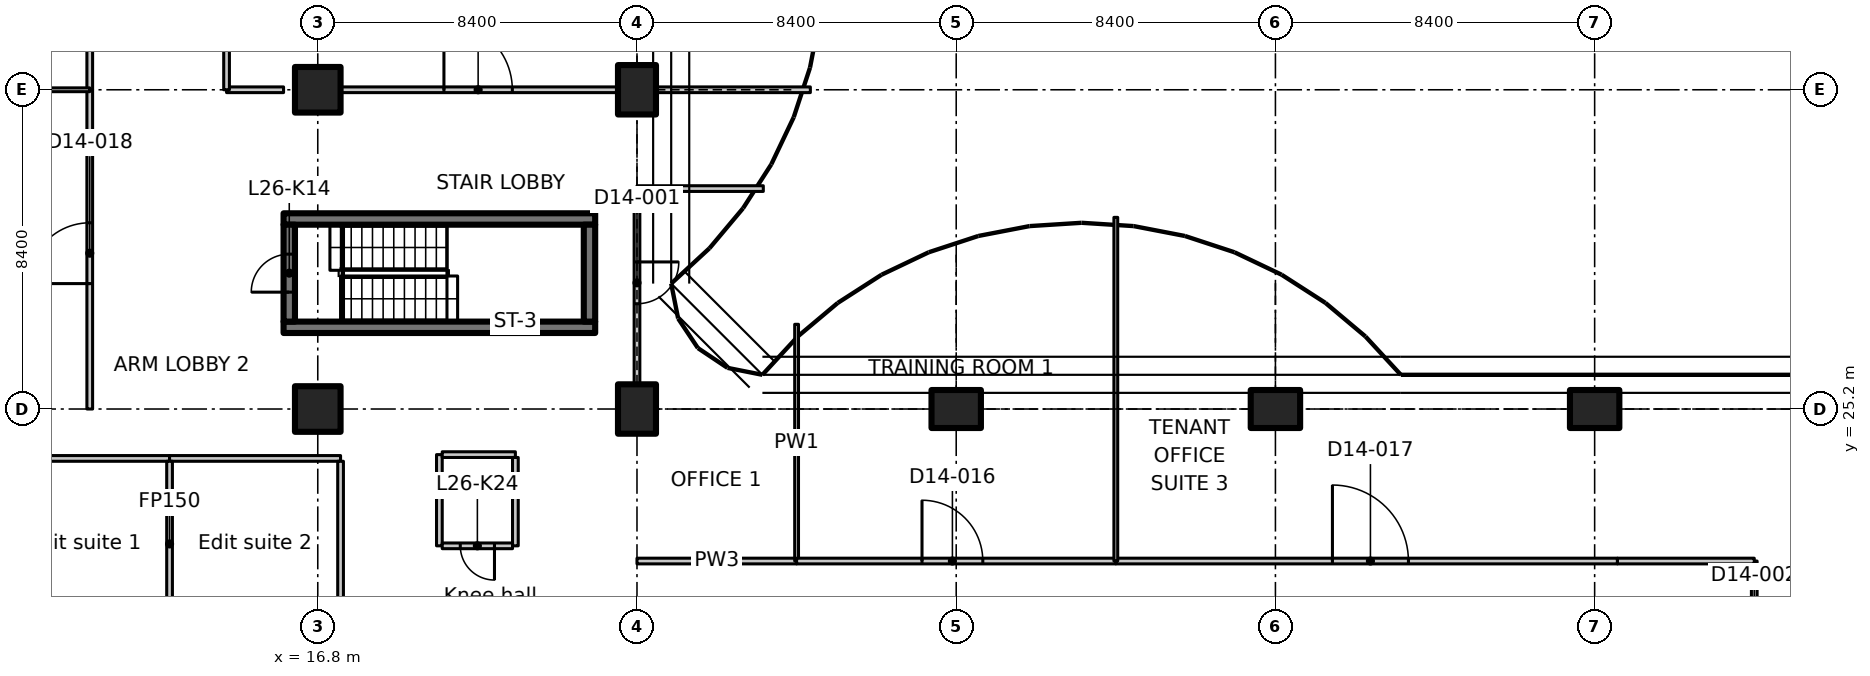
"""IFC4 building model, lengths in metres.
Left out: names, types, materials, properties, quantities, classifications, styles, units other than length and angle.
Written with IfcOpenShell. Run it as: python <this file> out.ifc"""

import sys

from ifc_helpers import new_model, si_unit, direction, frame, frame_2d, origin, origin_2d, place, context, subcontext, project, spatial, polyline, rectangle, outline, extrude, element, fill, save


model = new_model("IFC4")
c1 = context("Model", 3, precision=1e-05, world=origin(), true_north=direction((0.0, 1.0)))
c2 = subcontext(c1, "Body", "Model", "MODEL_VIEW")
j1 = project(units=[si_unit("LENGTHUNIT", "METRE"), si_unit("PLANEANGLEUNIT", "RADIAN")], contexts=[c1])
p1 = place(None, origin())
s1 = spatial("IfcSite", under=j1, at=p1, CompositionType="ELEMENT")
p2 = place(p1, origin())
s2 = spatial("IfcBuilding", under=s1, at=p2, CompositionType="ELEMENT")
p3 = place(p2, frame((0.0, 0.0, 109.7)))
s3 = spatial("IfcBuildingStorey", under=s2, at=p3, CompositionType="ELEMENT", Elevation=109.7)
for number, where, z_axis, x_axis in (
    (1, (16.8, 25.2, 0.0), (0.0, 0.0, 1.0), (1.0, 0.0, 0.0)),
    (2, (16.8, 33.6, 0.0), (0.0, 0.0, 1.0), (1.0, 0.0, 0.0)),
):
    element("IfcColumn", number, at=place(p3, frame(where, z_axis=z_axis, x_axis=x_axis)), inside=s3, PredefinedType="COLUMN", context=c2, shape_type="SweptSolid", body=[
        extrude(rectangle(XDim=1.2, YDim=1.2, at=origin_2d()), origin(), (0.0, 0.0, 1.0), 3.35),
    ])
for number, where, z_axis, x_axis in (
    (3, (25.2, 25.2, 0.0), (0.0, 0.0, 1.0), (1.0, 0.0, 0.0)),
    (4, (25.2, 33.6, 0.0), (0.0, 0.0, 1.0), (1.0, 0.0, 0.0)),
    (5, (33.6, 25.2, 0.0), (0.0, 0.0, 1.0), (0.0, 1.0, 0.0)),
    (6, (42.0, 25.2, 0.0), (0.0, 0.0, 1.0), (0.0, 1.0, 0.0)),
    (7, (50.4, 25.2, 0.0), (0.0, 0.0, 1.0), (0.0, 1.0, 0.0)),
):
    element("IfcColumn", number, at=place(p3, frame(where, z_axis=z_axis, x_axis=x_axis)), inside=s3, PredefinedType="COLUMN", context=c2, shape_type="SweptSolid", body=[
        extrude(rectangle(XDim=1.0, YDim=1.3, at=origin_2d()), origin(), (0.0, 0.0, 1.0), 3.35),
    ])
for number, where, z_axis, x_axis in (
    (8, (15.9, 27.35, 0.0), (0.0, 0.0, 1.0), (1.0, 0.0, 0.0)),
    (9, (15.9, 30.2, 0.0), (0.0, 0.0, 1.0), (1.0, 0.0, 0.0)),
):
    element("IfcWall", number, at=place(p3, frame(where, z_axis=z_axis, x_axis=x_axis)), inside=s3, PredefinedType="SHEAR", context=c2, shape_type="SweptSolid", body=[
        extrude(rectangle(XDim=8.2, YDim=0.3, at=frame_2d((4.1, 0.0))), origin(), (0.0, 0.0, 1.0), 3.35),
    ])
p4 = place(p3, frame((16.05, 27.5, 0.0), z_axis=(0.0, 0.0, 1.0), x_axis=(0.0, 1.0, 0.0)))
e10 = element("IfcWall", 10, at=p4, inside=s3, PredefinedType="SHEAR", context=c2, shape_type="SweptSolid", body=[
    extrude(rectangle(XDim=2.55, YDim=0.3, at=frame_2d((1.275, 0.0))), origin(), (0.0, 0.0, 1.0), 3.35),
])
p5 = place(p4, frame((0.775, 0.0, 0.0)))
e11 = element("IfcOpeningElement", 11, at=p5, cuts=e10, PredefinedType="OPENING", context=c2, shape_type="SweptSolid", body=[
    extrude(rectangle(XDim=1.0, YDim=2.1, at=frame_2d((0.5, 1.05))), frame((0.0, 0.16, 0.0), z_axis=(0.0, -1.0, 0.0), x_axis=(1.0, 0.0, 0.0)), (0.0, 0.0, 1.0), 0.32),
])
p6 = place(p3, frame((23.95, 27.5, 0.0), z_axis=(0.0, 0.0, 1.0), x_axis=(0.0, 1.0, 0.0)))
e12 = element("IfcWall", 12, at=p6, inside=s3, PredefinedType="SHEAR", context=c2, shape_type="SweptSolid", body=[
    extrude(rectangle(XDim=2.55, YDim=0.3, at=frame_2d((1.275, 0.0))), origin(), (0.0, 0.0, 1.0), 3.35),
])
p7 = place(p3, frame((8.575, 23.9, 0.0), z_axis=(0.0, 0.0, 1.0), x_axis=(1.0, 0.0, 0.0)))
e13 = element("IfcWall", 13, at=p7, inside=s3, PredefinedType="PARTITIONING", context=c2, shape_type="SweptSolid", body=[
    extrude(rectangle(XDim=4.325, YDim=0.15, at=frame_2d((2.163, 0.0))), origin(), (0.0, 0.0, 1.0), 3.35),
])
p8 = place(p3, frame((12.9, 23.9, 0.0), z_axis=(0.0, 0.0, 1.0), x_axis=(1.0, 0.0, 0.0)))
e14 = element("IfcWall", 14, at=p8, inside=s3, PredefinedType="PARTITIONING", context=c2, shape_type="SweptSolid", body=[
    extrude(rectangle(XDim=4.5, YDim=0.15, at=frame_2d((2.25, 0.0))), origin(), (0.0, 0.0, 1.0), 3.35),
])
p9 = place(p3, frame((17.4, 23.825, 0.0), z_axis=(0.0, 0.0, 1.0), x_axis=(0.0, -1.0, 0.0)))
e15 = element("IfcWall", 15, at=p9, inside=s3, PredefinedType="PARTITIONING", context=c2, shape_type="SweptSolid", body=[
    extrude(rectangle(XDim=4.425, YDim=0.15, at=frame_2d((2.212, 0.0))), origin(), (0.0, 0.0, 1.0), 3.35),
])
p10 = place(p3, frame((12.9, 23.825, 0.0), z_axis=(0.0, 0.0, 1.0), x_axis=(0.0, -1.0, 0.0)))
e16 = element("IfcWall", 16, at=p10, inside=s3, PredefinedType="PARTITIONING", context=c2, shape_type="SweptSolid", body=[
    extrude(rectangle(XDim=4.35, YDim=0.15, at=frame_2d((2.175, 0.0))), origin(), (0.0, 0.0, 1.0), 3.35),
])
p11 = place(p3, frame((20.0, 21.6, 0.0), z_axis=(0.0, 0.0, 1.0), x_axis=(0.0, 1.0, 0.0)))
e17 = element("IfcWall", 17, at=p11, inside=s3, PredefinedType="PARTITIONING", context=c2, shape_type="SweptSolid", body=[
    extrude(rectangle(XDim=2.4, YDim=0.15, at=frame_2d((1.2, 0.0))), origin(), (0.0, 0.0, 1.0), 3.35),
])
p12 = place(p3, frame((20.075, 24.0, 0.0), z_axis=(0.0, 0.0, 1.0), x_axis=(1.0, 0.0, 0.0)))
e18 = element("IfcWall", 18, at=p12, inside=s3, PredefinedType="PARTITIONING", context=c2, shape_type="SweptSolid", body=[
    extrude(rectangle(XDim=1.925, YDim=0.15, at=frame_2d((0.962, 0.0))), origin(), (0.0, 0.0, 1.0), 3.35),
])
p13 = place(p3, frame((22.0, 23.925, 0.0), z_axis=(0.0, 0.0, 1.0), x_axis=(0.0, -1.0, 0.0)))
e19 = element("IfcWall", 19, at=p13, inside=s3, PredefinedType="PARTITIONING", context=c2, shape_type="SweptSolid", body=[
    extrude(rectangle(XDim=2.325, YDim=0.15, at=frame_2d((1.163, 0.0))), origin(), (0.0, 0.0, 1.0), 3.35),
])
p14 = place(p3, frame((21.925, 21.6, 0.0), z_axis=(0.0, 0.0, 1.0), x_axis=(-1.0, 0.0, 0.0)))
e20 = element("IfcWall", 20, at=p14, inside=s3, PredefinedType="PARTITIONING", context=c2, shape_type="SweptSolid", body=[
    extrude(rectangle(XDim=1.85, YDim=0.15, at=frame_2d((0.925, 0.0))), origin(), (0.0, 0.0, 1.0), 3.35),
])
p15 = place(p14, frame((0.475, 0.0, 0.0)))
e21 = element("IfcOpeningElement", 21, at=p15, cuts=e20, PredefinedType="OPENING", context=c2, shape_type="SweptSolid", body=[
    extrude(rectangle(XDim=0.9, YDim=2.1, at=frame_2d((0.45, 1.05))), frame((0.0, 0.085, 0.0), z_axis=(0.0, -1.0, 0.0), x_axis=(1.0, 0.0, 0.0)), (0.0, 0.0, 1.0), 0.17),
])
p16 = place(p3, frame((25.2, 21.2, 0.0), z_axis=(0.0, 0.0, 1.0), x_axis=(1.0, 0.0, 0.0)))
e22 = element("IfcWall", 22, at=p16, inside=s3, PredefinedType="PARTITIONING", context=c2, shape_type="SweptSolid", body=[
    extrude(rectangle(XDim=4.2, YDim=0.15, at=frame_2d((2.1, 0.0))), origin(), (0.0, 0.0, 1.0), 3.33),
])
p17 = place(p3, frame((29.4, 27.429, 0.0), z_axis=(0.0, 0.0, 1.0), x_axis=(0.0, -1.0, 0.0)))
e23 = element("IfcWall", 23, at=p17, inside=s3, PredefinedType="PARTITIONING", context=c2, shape_type="SweptSolid", body=[
    extrude(outline(polyline([(0.0, 0.0), (6.229, 0.0), (6.229, 3.33), (2.679, 3.33), (2.677, 2.98), (1.781, 2.98), (1.779, 3.33), (0.154, 3.33), (0.0, 3.33), (0.0, 0.0)])), frame((0.0, 0.05, 0.0), z_axis=(0.0, -1.0, 0.0), x_axis=(1.0, 0.0, 0.0)), (0.0, 0.0, 1.0), 0.1),
])
p18 = place(p3, frame((25.2, 31.0, 0.0), z_axis=(0.0, 0.0, 1.0), x_axis=(0.0, -1.0, 0.0)))
e24 = element("IfcWall", 24, at=p18, inside=s3, PredefinedType="PARTITIONING", context=c2, shape_type="SweptSolid", body=[
    extrude(outline(polyline([(0.0, 0.0), (5.13, 0.0), (5.13, 2.98), (0.0, 2.98), (0.0, 0.0)])), frame((0.0, 0.075, 0.0), z_axis=(0.0, -1.0, 0.0), x_axis=(1.0, 0.0, 0.0)), (0.0, 0.0, 1.0), 0.15),
])
p19 = place(p18, frame((1.93, 0.0, 0.0)))
e25 = element("IfcOpeningElement", 25, at=p19, cuts=e24, PredefinedType="OPENING", context=c2, shape_type="SweptSolid", body=[
    extrude(rectangle(XDim=1.1, YDim=2.1, at=frame_2d((0.55, 1.05))), frame((0.0, 0.085, 0.0), z_axis=(0.0, -1.0, 0.0), x_axis=(1.0, 0.0, 0.0)), (0.0, 0.0, 1.0), 0.17),
])
p20 = place(p3, frame((25.2, 31.0, 0.0), z_axis=(0.0, 0.0, 1.0), x_axis=(1.0, 0.0, 0.0)))
e26 = element("IfcWall", 26, at=p20, inside=s3, PredefinedType="PARTITIONING", context=c2, shape_type="SweptSolid", body=[
    extrude(rectangle(XDim=3.324, YDim=0.15, at=frame_2d((1.662, 0.0))), origin(), (0.0, 0.0, 1.0), 2.98),
])
p21 = place(p3, frame((54.6, 21.2, 0.0), z_axis=(0.0, 0.0, 1.0), x_axis=(0.0, -1.0, 0.0)))
e27 = element("IfcWall", 27, at=p21, inside=s3, PredefinedType="PARTITIONING", context=c2, shape_type="SweptSolid", body=[
    extrude(rectangle(XDim=8.2, YDim=0.15, at=frame_2d((4.1, 0.0))), origin(), (0.0, 0.0, 1.0), 3.33),
])
p22 = place(p21, frame((3.2, 0.0, 0.0)))
e28 = element("IfcOpeningElement", 28, at=p22, cuts=e27, PredefinedType="OPENING", context=c2, shape_type="SweptSolid", body=[
    extrude(rectangle(XDim=2.0, YDim=2.4, at=frame_2d((1.0, 1.2))), frame((0.0, 0.085, 0.0), z_axis=(0.0, -1.0, 0.0), x_axis=(1.0, 0.0, 0.0)), (0.0, 0.0, 1.0), 0.17),
])
p23 = place(p3, frame((29.4, 21.2, 0.0), z_axis=(0.0, 0.0, 1.0), x_axis=(1.0, 0.0, 0.0)))
e29 = element("IfcWall", 29, at=p23, inside=s3, PredefinedType="PARTITIONING", context=c2, shape_type="SweptSolid", body=[
    extrude(rectangle(XDim=8.4, YDim=0.15, at=frame_2d((4.2, 0.0))), origin(), (0.0, 0.0, 1.0), 3.33),
])
p24 = place(p23, frame((3.3, 0.0, 0.0)))
e30 = element("IfcOpeningElement", 30, at=p24, cuts=e29, PredefinedType="OPENING", context=c2, shape_type="SweptSolid", body=[
    extrude(rectangle(XDim=1.6, YDim=2.1, at=frame_2d((0.8, 1.05))), frame((0.0, 0.085, 0.0), z_axis=(0.0, -1.0, 0.0), x_axis=(1.0, 0.0, 0.0)), (0.0, 0.0, 1.0), 0.17),
])
p25 = place(p3, frame((37.8, 21.2, 0.0), z_axis=(0.0, 0.0, 1.0), x_axis=(1.0, 0.0, 0.0)))
e31 = element("IfcWall", 31, at=p25, inside=s3, PredefinedType="PARTITIONING", context=c2, shape_type="SweptSolid", body=[
    extrude(rectangle(XDim=13.2, YDim=0.15, at=frame_2d((6.6, 0.0))), origin(), (0.0, 0.0, 1.0), 3.33),
])
p26 = place(p25, frame((5.7, 0.0, 0.0)))
e32 = element("IfcOpeningElement", 32, at=p26, cuts=e31, PredefinedType="OPENING", context=c2, shape_type="SweptSolid", body=[
    extrude(rectangle(XDim=2.0, YDim=2.4, at=frame_2d((1.0, 1.2))), frame((0.0, 0.085, 0.0), z_axis=(0.0, -1.0, 0.0), x_axis=(1.0, 0.0, 0.0)), (0.0, 0.0, 1.0), 0.17),
])
p27 = place(p3, frame((51.0, 21.2, 0.0), z_axis=(0.0, 0.0, 1.0), x_axis=(1.0, 0.0, 0.0)))
e33 = element("IfcWall", 33, at=p27, inside=s3, PredefinedType="PARTITIONING", context=c2, shape_type="SweptSolid", body=[
    extrude(rectangle(XDim=3.6, YDim=0.15, at=frame_2d((1.8, 0.0))), origin(), (0.0, 0.0, 1.0), 3.33),
])
p28 = place(p3, frame((37.8, 30.243, 0.0), z_axis=(0.0, 0.0, 1.0), x_axis=(0.0, -1.0, 0.0)))
e34 = element("IfcWall", 34, at=p28, inside=s3, PredefinedType="PARTITIONING", context=c2, shape_type="SweptSolid", body=[
    extrude(outline(polyline([(0.0, 0.0), (9.043, 0.0), (9.043, 3.33), (5.493, 3.33), (5.491, 2.98), (4.595, 2.98), (4.593, 3.33), (0.0, 3.33), (0.0, 0.0)])), frame((0.0, 0.05, 0.0), z_axis=(0.0, -1.0, 0.0), x_axis=(1.0, 0.0, 0.0)), (0.0, 0.0, 1.0), 0.1),
])
p29 = place(p3, frame((10.8, 25.2, 0.0), z_axis=(0.0, 0.0, 1.0), x_axis=(0.0, 1.0, 0.0)))
e35 = element("IfcWall", 35, at=p29, inside=s3, PredefinedType="PARTITIONING", context=c2, shape_type="SweptSolid", body=[
    extrude(rectangle(XDim=8.4, YDim=0.15, at=frame_2d((4.2, 0.0))), origin(), (0.0, 0.0, 1.0), 3.33),
])
p30 = place(p29, frame((3.3, 0.0, 0.0)))
e36 = element("IfcOpeningElement", 36, at=p30, cuts=e35, PredefinedType="OPENING", context=c2, shape_type="SweptSolid", body=[
    extrude(rectangle(XDim=1.6, YDim=2.1, at=frame_2d((0.8, 1.05))), frame((0.0, 0.085, 0.0), z_axis=(0.0, -1.0, 0.0), x_axis=(1.0, 0.0, 0.0)), (0.0, 0.0, 1.0), 0.17),
])
p31 = place(p3, frame((14.4, 33.6, 0.0), z_axis=(0.0, 0.0, 1.0), x_axis=(1.0, 0.0, 0.0)))
e37 = element("IfcWall", 37, at=p31, inside=s3, PredefinedType="PARTITIONING", context=c2, shape_type="SweptSolid", body=[
    extrude(rectangle(XDim=1.5, YDim=0.15, at=frame_2d((0.75, 0.0))), origin(), (0.0, 0.0, 1.0), 3.33),
])
p32 = place(p3, frame((17.42, 33.6, 0.0), z_axis=(0.0, 0.0, 1.0), x_axis=(1.0, 0.0, 0.0)))
e38 = element("IfcWall", 38, at=p32, inside=s3, PredefinedType="PARTITIONING", context=c2, shape_type="SweptSolid", body=[
    extrude(rectangle(XDim=7.26, YDim=0.15, at=frame_2d((3.63, 0.0))), origin(), (0.0, 0.0, 1.0), 3.33),
])
p33 = place(p32, frame((2.7, 0.0, 0.0)))
e39 = element("IfcOpeningElement", 39, at=p33, cuts=e38, PredefinedType="OPENING", context=c2, shape_type="SweptSolid", body=[
    extrude(rectangle(XDim=1.8, YDim=2.1, at=frame_2d((0.9, 1.05))), frame((0.0, 0.085, 0.0), z_axis=(0.0, -1.0, 0.0), x_axis=(1.0, 0.0, 0.0)), (0.0, 0.0, 1.0), 0.17),
])
p34 = place(p3, frame((25.72, 33.6, 0.0), z_axis=(0.0, 0.0, 1.0), x_axis=(1.0, 0.0, 0.0)))
e40 = element("IfcWall", 40, at=p34, inside=s3, PredefinedType="PARTITIONING", context=c2, shape_type="SweptSolid", body=[
    extrude(rectangle(XDim=4.042, YDim=0.15, at=frame_2d((2.021, 0.0))), origin(), (0.0, 0.0, 1.0), 2.98),
])
p35 = place(p3, frame((10.8, 33.6, 0.0), z_axis=(0.0, 0.0, 1.0), x_axis=(0.0, 1.0, 0.0)))
e41 = element("IfcWall", 41, at=p35, inside=s3, PredefinedType="PARTITIONING", context=c2, shape_type="SweptSolid", body=[
    extrude(rectangle(XDim=8.4, YDim=0.15, at=frame_2d((4.2, 0.0))), origin(), (0.0, 0.0, 1.0), 3.33),
])
p36 = place(p35, frame((3.3, 0.0, 0.0)))
e42 = element("IfcOpeningElement", 42, at=p36, cuts=e41, PredefinedType="OPENING", context=c2, shape_type="SweptSolid", body=[
    extrude(rectangle(XDim=1.6, YDim=2.1, at=frame_2d((0.8, 1.05))), frame((0.0, 0.085, 0.0), z_axis=(0.0, -1.0, 0.0), x_axis=(1.0, 0.0, 0.0)), (0.0, 0.0, 1.0), 0.17),
])
p37 = place(p3, frame((14.4, 42.0, 0.0), z_axis=(0.0, 0.0, 1.0), x_axis=(0.0, -1.0, 0.0)))
e43 = element("IfcWall", 43, at=p37, inside=s3, PredefinedType="PARTITIONING", context=c2, shape_type="SweptSolid", body=[
    extrude(rectangle(XDim=8.4, YDim=0.15, at=frame_2d((4.2, 0.0))), origin(), (0.0, 0.0, 1.0), 3.33),
])
p38 = place(p3, frame((9.02, 33.6, 0.0), z_axis=(0.0, 0.0, 1.0), x_axis=(1.0, 0.0, 0.0)))
e44 = element("IfcWall", 44, at=p38, inside=s3, PredefinedType="PARTITIONING", context=c2, shape_type="SweptSolid", body=[
    extrude(rectangle(XDim=1.78, YDim=0.1, at=frame_2d((0.89, 0.0))), origin(), (0.0, 0.0, 1.0), 3.33),
])
p39 = place(p5, origin())
e45 = element("IfcDoor", 45, at=p39, inside=s3, OperationType="SINGLE_SWING_RIGHT", PredefinedType="DOOR", context=c2, shape_type="SweptSolid", body=[
    extrude(rectangle(XDim=1.0, YDim=2.1, at=frame_2d((0.5, 1.05))), frame((0.0, 0.025, 0.0), z_axis=(0.0, -1.0, 0.0), x_axis=(1.0, 0.0, 0.0)), (0.0, 0.0, 1.0), 0.05),
])
fill(e11, e45)
p40 = place(p15, origin())
e46 = element("IfcDoor", 46, at=p40, inside=s3, OperationType="SINGLE_SWING_RIGHT", PredefinedType="DOOR", context=c2, shape_type="SweptSolid", body=[
    extrude(rectangle(XDim=0.9, YDim=2.1, at=frame_2d((0.45, 1.05))), frame((0.0, 0.025, 0.0), z_axis=(0.0, -1.0, 0.0), x_axis=(1.0, 0.0, 0.0)), (0.0, 0.0, 1.0), 0.05),
])
fill(e21, e46)
p41 = place(p19, origin())
e47 = element("IfcDoor", 47, at=p41, inside=s3, OperationType="SINGLE_SWING_RIGHT", PredefinedType="DOOR", context=c2, shape_type="SweptSolid", body=[
    extrude(rectangle(XDim=1.1, YDim=2.1, at=frame_2d((0.55, 1.05))), frame((0.0, 0.025, 0.0), z_axis=(0.0, -1.0, 0.0), x_axis=(1.0, 0.0, 0.0)), (0.0, 0.0, 1.0), 0.05),
])
fill(e25, e47)
p42 = place(p24, origin())
e48 = element("IfcDoor", 48, at=p42, inside=s3, OperationType="DOUBLE_DOOR_SINGLE_SWING", PredefinedType="DOOR", context=c2, shape_type="SweptSolid", body=[
    extrude(rectangle(XDim=1.6, YDim=2.1, at=frame_2d((0.8, 1.05))), frame((0.0, 0.025, 0.0), z_axis=(0.0, -1.0, 0.0), x_axis=(1.0, 0.0, 0.0)), (0.0, 0.0, 1.0), 0.05),
])
fill(e30, e48)
p43 = place(p26, origin())
e49 = element("IfcDoor", 49, at=p43, inside=s3, OperationType="DOUBLE_DOOR_SINGLE_SWING", PredefinedType="DOOR", context=c2, shape_type="SweptSolid", body=[
    extrude(rectangle(XDim=2.0, YDim=2.4, at=frame_2d((1.0, 1.2))), frame((0.0, 0.025, 0.0), z_axis=(0.0, -1.0, 0.0), x_axis=(1.0, 0.0, 0.0)), (0.0, 0.0, 1.0), 0.05),
])
fill(e32, e49)
p44 = place(p30, origin())
e50 = element("IfcDoor", 50, at=p44, inside=s3, OperationType="DOUBLE_DOOR_SINGLE_SWING", PredefinedType="DOOR", context=c2, shape_type="SweptSolid", body=[
    extrude(rectangle(XDim=1.6, YDim=2.1, at=frame_2d((0.8, 1.05))), frame((0.0, 0.025, 0.0), z_axis=(0.0, -1.0, 0.0), x_axis=(1.0, 0.0, 0.0)), (0.0, 0.0, 1.0), 0.05),
])
fill(e36, e50)
p45 = place(p33, origin())
e51 = element("IfcDoor", 51, at=p45, inside=s3, OperationType="DOUBLE_DOOR_SINGLE_SWING", PredefinedType="DOOR", context=c2, shape_type="SweptSolid", body=[
    extrude(rectangle(XDim=1.8, YDim=2.1, at=frame_2d((0.9, 1.05))), frame((0.0, 0.025, 0.0), z_axis=(0.0, -1.0, 0.0), x_axis=(1.0, 0.0, 0.0)), (0.0, 0.0, 1.0), 0.05),
])
fill(e39, e51)
save(model, sys.argv[1])
